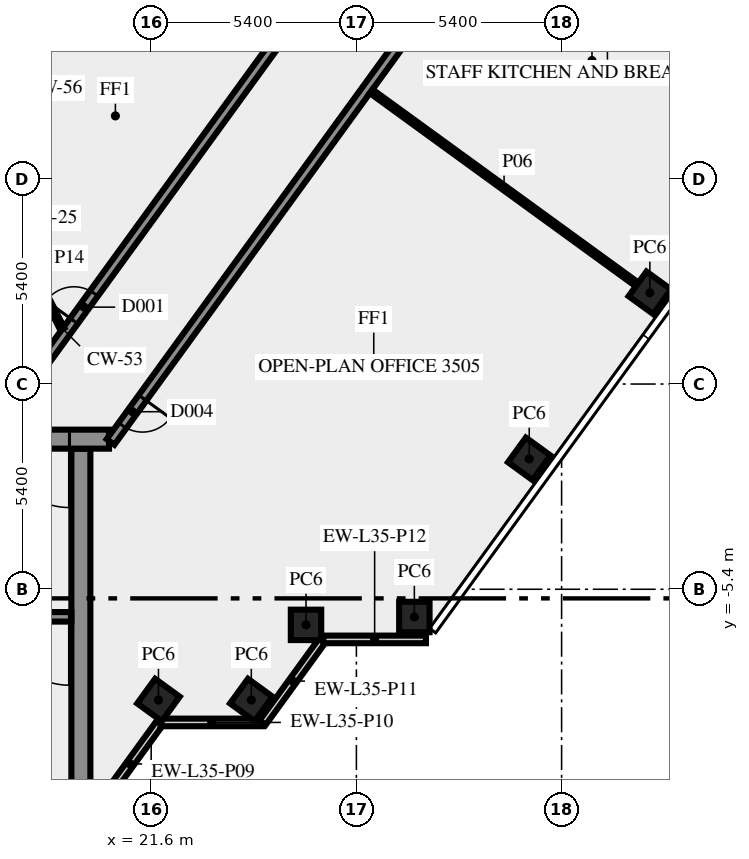
"""IFC4 building model, lengths in metres.
Left out: names, types, materials, properties, quantities, classifications, styles, units other than length and angle.
Written with IfcOpenShell. Run it as: python <this file> out.ifc"""

import sys

from ifc_helpers import new_model, si_unit, direction, frame, frame_2d, origin, origin_2d, place, context, subcontext, project, spatial, rectangle, extrude, element, fill, save


model = new_model("IFC4")
c1 = context("Model", 3, precision=1e-05, world=origin(), true_north=direction((0.0, 1.0)))
c2 = subcontext(c1, "Body", "Model", "MODEL_VIEW")
j1 = project(units=[si_unit("LENGTHUNIT", "METRE"), si_unit("PLANEANGLEUNIT", "RADIAN")], contexts=[c1])
p1 = place(None, origin())
s1 = spatial("IfcSite", under=j1, at=p1, CompositionType="ELEMENT")
p2 = place(p1, origin())
s2 = spatial("IfcBuilding", under=s1, at=p2, CompositionType="ELEMENT")
p3 = place(p2, frame((0.0, 0.0, 152.0)))
s3 = spatial("IfcBuildingStorey", under=s2, at=p3, CompositionType="ELEMENT", Elevation=152.0)
for number, where, z_axis, x_axis in (
    (1, (21.792, -8.315, 0.0), (0.0, 0.0, 1.0), (0.588, 0.809, 0.0)),
    (2, (24.235, -8.315, 0.0), (0.0, 0.0, 1.0), (0.588, 0.809, 0.0)),
    (3, (25.674, -6.337, 0.0), (0.0, 0.0, 1.0), (1.0, 0.0, 0.0)),
    (4, (28.525, -6.13, 0.0), (0.0, 0.0, 1.0), (1.0, 0.0, 0.0)),
    (5, (31.548, -1.969, 0.0), (0.0, 0.0, 1.0), (0.588, 0.809, 0.0)),
    (6, (34.722, 2.4, 0.0), (0.0, 0.0, 1.0), (0.588, 0.809, 0.0)),
):
    element("IfcColumn", number, at=place(p3, frame(where, z_axis=z_axis, x_axis=x_axis)), inside=s3, PredefinedType="COLUMN", context=c2, shape_type="SweptSolid", body=[
        extrude(rectangle(XDim=0.8, YDim=0.8, at=origin_2d()), origin(), (0.0, 0.0, 1.0), 3.65),
    ])
p4 = place(p3, frame((20.253, -11.083, 0.0), z_axis=(0.0, 0.0, 1.0), x_axis=(0.587766567315, 0.809030569476, 0.0)))
e7 = element("IfcWall", 7, at=p4, inside=s3, PredefinedType="SOLIDWALL", context=c2, shape_type="SweptSolid", body=[
    extrude(rectangle(XDim=2.688, YDim=0.2, at=frame_2d((1.344, 0.0))), origin(), (0.0, 0.0, 1.0), 3.65),
])
p5 = place(p3, frame((21.843, -8.904, 0.0), z_axis=(0.0, 0.0, 1.0), x_axis=(1.0, 0.0, 0.0)))
e8 = element("IfcWall", 8, at=p5, inside=s3, PredefinedType="SOLIDWALL", context=c2, shape_type="SweptSolid", body=[
    extrude(rectangle(XDim=2.7, YDim=0.2, at=frame_2d((1.35, 0.0))), origin(), (0.0, 0.0, 1.0), 3.65),
])
p6 = place(p3, frame((24.533, -8.909, 0.0), z_axis=(0.0, 0.0, 1.0), x_axis=(0.587720002413, 0.809064397168, 0.0)))
e9 = element("IfcWall", 9, at=p6, inside=s3, PredefinedType="SOLIDWALL", context=c2, shape_type="SweptSolid", body=[
    extrude(rectangle(XDim=2.7, YDim=0.2, at=frame_2d((1.35, 0.0))), origin(), (0.0, 0.0, 1.0), 3.65),
])
p7 = place(p3, frame((26.13, -6.719, 0.0), z_axis=(0.0, 0.0, 1.0), x_axis=(1.0, 0.0, 0.0)))
e10 = element("IfcWall", 10, at=p7, inside=s3, PredefinedType="SOLIDWALL", context=c2, shape_type="SweptSolid", body=[
    extrude(rectangle(XDim=2.7, YDim=0.2, at=frame_2d((1.35, 0.0))), origin(), (0.0, 0.0, 1.0), 3.65),
])
p8 = place(p3, frame((19.75, -10.5, 0.0), z_axis=(0.0, 0.0, 1.0), x_axis=(0.0, 1.0, 0.0)))
e11 = element("IfcWall", 11, at=p8, inside=s3, PredefinedType="SHEAR", context=c2, shape_type="SweptSolid", body=[
    extrude(rectangle(XDim=8.8, YDim=0.5, at=frame_2d((4.4, 0.0))), origin(), (0.0, 0.0, 1.0), 3.65),
])
p9 = place(p3, frame((19.5, -6.125, 0.0), z_axis=(0.0, 0.0, 1.0), x_axis=(-1.0, 0.0, 0.0)))
e12 = element("IfcWall", 12, at=p9, inside=s3, PredefinedType="SHEAR", context=c2, shape_type="SweptSolid", body=[
    extrude(rectangle(XDim=8.05, YDim=0.25, at=frame_2d((4.025, 0.0))), origin(), (0.0, 0.0, 1.0), 3.65),
])
p10 = place(p9, frame((0.05, 0.0, 0.0)))
e13 = element("IfcOpeningElement", 13, at=p10, cuts=e12, PredefinedType="OPENING", context=c2, shape_type="SweptSolid", body=[
    extrude(rectangle(XDim=1.8, YDim=2.1, at=frame_2d((0.9, 1.05))), frame((0.0, 0.135, 0.0), z_axis=(0.0, -1.0, 0.0), x_axis=(1.0, 0.0, 0.0)), (0.0, 0.0, 1.0), 0.27),
])
p11 = place(p3, frame((20.49, -1.45, 0.0), z_axis=(0.0, 0.0, 1.0), x_axis=(-1.0, 0.0, 0.0)))
e14 = element("IfcWall", 14, at=p11, inside=s3, PredefinedType="SHEAR", context=c2, shape_type="SweptSolid", body=[
    extrude(rectangle(XDim=40.98, YDim=0.5, at=frame_2d((20.49, 0.0))), origin(), (0.0, 0.0, 1.0), 3.65),
])
p12 = place(p11, frame((38.14, 0.0, 0.0)))
e15 = element("IfcOpeningElement", 15, at=p12, cuts=e14, PredefinedType="OPENING", context=c2, shape_type="SweptSolid", body=[
    extrude(rectangle(XDim=1.8, YDim=2.1, at=frame_2d((0.9, 1.05))), frame((0.0, 0.26, 0.0), z_axis=(0.0, -1.0, 0.0), x_axis=(1.0, 0.0, 0.0)), (0.0, 0.0, 1.0), 0.52),
])
p13 = place(p11, frame((35.89, 0.0, 0.0)))
e16 = element("IfcOpeningElement", 16, at=p13, cuts=e14, PredefinedType="OPENING", context=c2, shape_type="SweptSolid", body=[
    extrude(rectangle(XDim=0.9, YDim=2.1, at=frame_2d((0.45, 1.05))), frame((0.0, 0.26, 0.0), z_axis=(0.0, -1.0, 0.0), x_axis=(1.0, 0.0, 0.0)), (0.0, 0.0, 1.0), 0.52),
])
p14 = place(p11, frame((32.94, 0.0, 0.0)))
e17 = element("IfcOpeningElement", 17, at=p14, cuts=e14, PredefinedType="OPENING", context=c2, shape_type="SweptSolid", body=[
    extrude(rectangle(XDim=0.9, YDim=2.1, at=frame_2d((0.45, 1.05))), frame((0.0, 0.26, 0.0), z_axis=(0.0, -1.0, 0.0), x_axis=(1.0, 0.0, 0.0)), (0.0, 0.0, 1.0), 0.52),
])
p15 = place(p11, frame((29.802, 0.0, 0.0)))
e18 = element("IfcOpeningElement", 18, at=p15, cuts=e14, PredefinedType="OPENING", context=c2, shape_type="SweptSolid", body=[
    extrude(rectangle(XDim=0.9, YDim=2.1, at=frame_2d((0.45, 1.05))), frame((0.0, 0.26, 0.0), z_axis=(0.0, -1.0, 0.0), x_axis=(1.0, 0.0, 0.0)), (0.0, 0.0, 1.0), 0.52),
])
p16 = place(p11, frame((26.077, 0.0, 0.0)))
e19 = element("IfcOpeningElement", 19, at=p16, cuts=e14, PredefinedType="OPENING", context=c2, shape_type="SweptSolid", body=[
    extrude(rectangle(XDim=0.9, YDim=2.1, at=frame_2d((0.45, 1.05))), frame((0.0, 0.26, 0.0), z_axis=(0.0, -1.0, 0.0), x_axis=(1.0, 0.0, 0.0)), (0.0, 0.0, 1.0), 0.52),
])
p17 = place(p11, frame((19.59, 0.0, 0.0)))
e20 = element("IfcOpeningElement", 20, at=p17, cuts=e14, PredefinedType="OPENING", context=c2, shape_type="SweptSolid", body=[
    extrude(rectangle(XDim=2.0, YDim=2.1, at=frame_2d((1.0, 1.05))), frame((0.0, 0.26, 0.0), z_axis=(0.0, -1.0, 0.0), x_axis=(1.0, 0.0, 0.0)), (0.0, 0.0, 1.0), 0.52),
])
p18 = place(p11, frame((7.14, 0.0, 0.0)))
e21 = element("IfcOpeningElement", 21, at=p18, cuts=e14, PredefinedType="OPENING", context=c2, shape_type="SweptSolid", body=[
    extrude(rectangle(XDim=0.9, YDim=2.1, at=frame_2d((0.45, 1.05))), frame((0.0, 0.26, 0.0), z_axis=(0.0, -1.0, 0.0), x_axis=(1.0, 0.0, 0.0)), (0.0, 0.0, 1.0), 0.52),
])
p19 = place(p11, frame((5.028, 0.0, 0.0)))
e22 = element("IfcOpeningElement", 22, at=p19, cuts=e14, PredefinedType="OPENING", context=c2, shape_type="SweptSolid", body=[
    extrude(rectangle(XDim=0.8, YDim=2.1, at=frame_2d((0.4, 1.05))), frame((0.0, 0.26, 0.0), z_axis=(0.0, -1.0, 0.0), x_axis=(1.0, 0.0, 0.0)), (0.0, 0.0, 1.0), 0.52),
])
p20 = place(p11, frame((3.452, 0.0, 0.0)))
e23 = element("IfcOpeningElement", 23, at=p20, cuts=e14, PredefinedType="OPENING", context=c2, shape_type="SweptSolid", body=[
    extrude(rectangle(XDim=0.8, YDim=2.1, at=frame_2d((0.4, 1.05))), frame((0.0, 0.26, 0.0), z_axis=(0.0, -1.0, 0.0), x_axis=(1.0, 0.0, 0.0)), (0.0, 0.0, 1.0), 0.52),
])
p21 = place(p11, frame((1.04, 0.0, 0.0)))
e24 = element("IfcOpeningElement", 24, at=p21, cuts=e14, PredefinedType="OPENING", context=c2, shape_type="SweptSolid", body=[
    extrude(rectangle(XDim=1.8, YDim=2.1, at=frame_2d((0.9, 1.05))), frame((0.0, 0.26, 0.0), z_axis=(0.0, -1.0, 0.0), x_axis=(1.0, 0.0, 0.0)), (0.0, 0.0, 1.0), 0.52),
])
p22 = place(p3, frame((17.545, -1.125, 0.0), z_axis=(0.0, 0.0, 1.0), x_axis=(0.587786330937, 0.809016210693, 0.0)))
e25 = element("IfcWall", 25, at=p22, inside=s3, PredefinedType="SOLIDWALL", context=c2, shape_type="SweptSolid", body=[
    extrude(rectangle(XDim=30.103, YDim=0.25, at=frame_2d((15.052, 0.0))), origin(), (0.0, 0.0, 1.0), 3.65),
])
p23 = place(p22, frame((3.441, 0.0, 0.0)))
e26 = element("IfcOpeningElement", 26, at=p23, cuts=e25, PredefinedType="OPENING", context=c2, shape_type="SweptSolid", body=[
    extrude(rectangle(XDim=0.9, YDim=2.1, at=frame_2d((0.45, 1.05))), frame((0.0, 0.135, 0.0), z_axis=(0.0, -1.0, 0.0), x_axis=(1.0, 0.0, 0.0)), (0.0, 0.0, 1.0), 0.27),
])
p24 = place(p22, frame((20.457, 0.0, 0.0)))
e27 = element("IfcOpeningElement", 27, at=p24, cuts=e25, PredefinedType="OPENING", context=c2, shape_type="SweptSolid", body=[
    extrude(rectangle(XDim=0.9, YDim=2.1, at=frame_2d((0.45, 1.05))), frame((0.0, 0.135, 0.0), z_axis=(0.0, -1.0, 0.0), x_axis=(1.0, 0.0, 0.0)), (0.0, 0.0, 1.0), 0.27),
])
p25 = place(p22, frame((18.858, 0.0, 0.0)))
e28 = element("IfcOpeningElement", 28, at=p25, cuts=e25, PredefinedType="OPENING", context=c2, shape_type="SweptSolid", body=[
    extrude(rectangle(XDim=0.9, YDim=2.1, at=frame_2d((0.45, 1.05))), frame((0.0, 0.135, 0.0), z_axis=(0.0, -1.0, 0.0), x_axis=(1.0, 0.0, 0.0)), (0.0, 0.0, 1.0), 0.27),
])
p26 = place(p3, frame((37.236, 21.469, 0.0), z_axis=(0.0, 0.0, 1.0), x_axis=(-0.58778344073, -0.809018310549, 0.0)))
e29 = element("IfcWall", 29, at=p26, inside=s3, PredefinedType="SOLIDWALL", context=c2, shape_type="SweptSolid", body=[
    extrude(rectangle(XDim=28.42, YDim=0.25, at=frame_2d((14.21, 0.0))), origin(), (0.0, 0.0, 1.0), 3.65),
])
p27 = place(p26, frame((26.988, 0.0, 0.0)))
e30 = element("IfcOpeningElement", 30, at=p27, cuts=e29, PredefinedType="OPENING", context=c2, shape_type="SweptSolid", body=[
    extrude(rectangle(XDim=0.9, YDim=2.1, at=frame_2d((0.45, 1.05))), frame((0.0, 0.135, 0.0), z_axis=(0.0, -1.0, 0.0), x_axis=(1.0, 0.0, 0.0)), (0.0, 0.0, 1.0), 0.27),
])
p28 = place(p26, frame((0.224, 0.0, 0.0)))
e31 = element("IfcOpeningElement", 31, at=p28, cuts=e29, PredefinedType="OPENING", context=c2, shape_type="SweptSolid", body=[
    extrude(rectangle(XDim=0.9, YDim=2.1, at=frame_2d((0.45, 1.05))), frame((0.0, 0.135, 0.0), z_axis=(0.0, -1.0, 0.0), x_axis=(1.0, 0.0, 0.0)), (0.0, 0.0, 1.0), 0.27),
])
p29 = place(p26, frame((9.155, 0.0, 0.0)))
e32 = element("IfcOpeningElement", 32, at=p29, cuts=e29, PredefinedType="OPENING", context=c2, shape_type="SweptSolid", body=[
    extrude(rectangle(XDim=0.9, YDim=2.1, at=frame_2d((0.45, 1.05))), frame((0.0, 0.135, 0.0), z_axis=(0.0, -1.0, 0.0), x_axis=(1.0, 0.0, 0.0)), (0.0, 0.0, 1.0), 0.27),
])
p30 = place(p3, frame((34.383, 2.622, 0.0), z_axis=(0.0, 0.0, 1.0), x_axis=(-0.809060825193, 0.587724919617, 0.0)))
e33 = element("IfcWall", 33, at=p30, inside=s3, PredefinedType="PARTITIONING", context=c2, shape_type="SweptSolid", body=[
    extrude(rectangle(XDim=8.645, YDim=0.12, at=frame_2d((4.322, 0.0))), origin(), (0.0, 0.0, 1.0), 3.65),
])
p31 = place(p3, frame((32.174, 14.288, 0.0), z_axis=(0.0, 0.0, 1.0), x_axis=(0.807664588563, -0.589642190131, 0.0)))
e34 = element("IfcWall", 34, at=p31, inside=s3, PredefinedType="SOLIDWALL", context=c2, shape_type="SweptSolid", body=[
    extrude(rectangle(XDim=9.55, YDim=0.2, at=frame_2d((4.775, 0.0))), origin(), (0.0, 0.0, 1.0), 2.85),
])
p32 = place(p3, frame((18.0, 3.925, 0.0), z_axis=(0.0, 0.0, 1.0), x_axis=(0.453950796792, -0.891026752736, 0.0)))
e35 = element("IfcWall", 35, at=p32, inside=s3, PredefinedType="PARTITIONING", context=c2, shape_type="SweptSolid", body=[
    extrude(rectangle(XDim=2.778, YDim=0.12, at=frame_2d((1.389, 0.0))), origin(), (0.0, 0.0, 1.0), 3.65),
])
p33 = place(p10, origin())
e36 = element("IfcDoor", 36, at=p33, inside=s3, OperationType="DOUBLE_DOOR_SINGLE_SWING", PredefinedType="DOOR", context=c2, shape_type="SweptSolid", body=[
    extrude(rectangle(XDim=1.8, YDim=2.1, at=frame_2d((0.9, 1.05))), frame((0.0, 0.025, 0.0), z_axis=(0.0, -1.0, 0.0), x_axis=(1.0, 0.0, 0.0)), (0.0, 0.0, 1.0), 0.05),
])
fill(e13, e36)
p34 = place(p21, origin())
e37 = element("IfcDoor", 37, at=p34, inside=s3, OperationType="DOUBLE_DOOR_SINGLE_SWING", PredefinedType="DOOR", context=c2, shape_type="SweptSolid", body=[
    extrude(rectangle(XDim=1.8, YDim=2.1, at=frame_2d((0.9, 1.05))), frame((0.0, 0.025, 0.0), z_axis=(0.0, -1.0, 0.0), x_axis=(1.0, 0.0, 0.0)), (0.0, 0.0, 1.0), 0.05),
])
fill(e24, e37)
p35 = place(p23, origin())
e38 = element("IfcDoor", 38, at=p35, inside=s3, OperationType="SINGLE_SWING_LEFT", PredefinedType="DOOR", context=c2, shape_type="SweptSolid", body=[
    extrude(rectangle(XDim=0.9, YDim=2.1, at=frame_2d((0.45, 1.05))), frame((0.0, 0.025, 0.0), z_axis=(0.0, -1.0, 0.0), x_axis=(1.0, 0.0, 0.0)), (0.0, 0.0, 1.0), 0.05),
])
fill(e26, e38)
p36 = place(p27, origin())
e39 = element("IfcDoor", 39, at=p36, inside=s3, OperationType="SINGLE_SWING_RIGHT", PredefinedType="DOOR", context=c2, shape_type="SweptSolid", body=[
    extrude(rectangle(XDim=0.9, YDim=2.1, at=frame_2d((0.45, 1.05))), frame((0.0, 0.025, 0.0), z_axis=(0.0, -1.0, 0.0), x_axis=(1.0, 0.0, 0.0)), (0.0, 0.0, 1.0), 0.05),
])
fill(e30, e39)
save(model, sys.argv[1])
